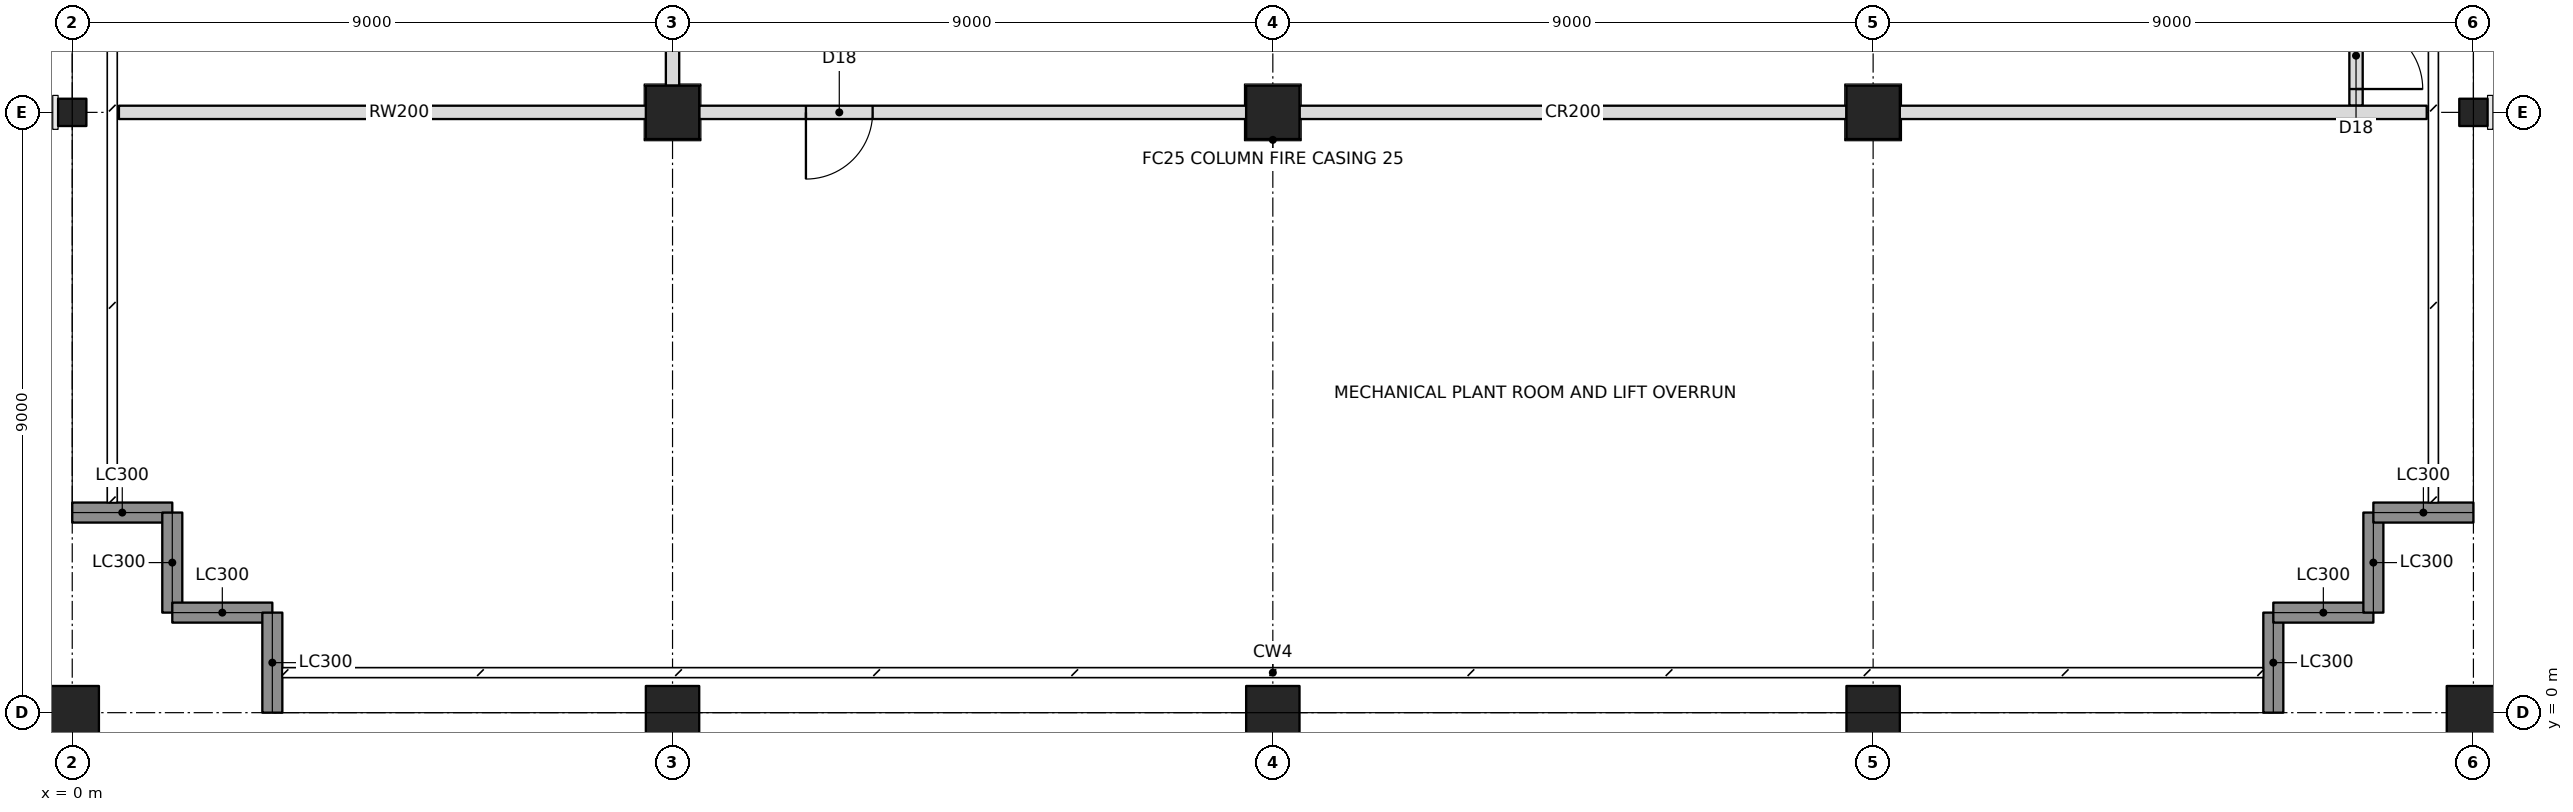
"""IFC4 building model, lengths in metres.
Left out: names, types, materials, properties, quantities, classifications, styles, units other than length and angle.
Written with IfcOpenShell. Run it as: python <this file> out.ifc"""

import sys

from ifc_helpers import new_model, si_unit, direction, frame, frame_2d, origin, origin_with_axes, origin_2d, place, context, subcontext, project, spatial, rectangle, hollow_rectangle, i_section, extrude, element, fill, save


model = new_model("IFC4")
c1 = context("Model", 3, precision=1e-05, world=origin(), true_north=direction((0.0, 1.0)))
c2 = subcontext(c1, "Body", "Model", "MODEL_VIEW")
j1 = project(units=[si_unit("LENGTHUNIT", "METRE"), si_unit("PLANEANGLEUNIT", "RADIAN")], contexts=[c1])
p1 = place(None, origin())
s1 = spatial("IfcSite", under=j1, at=p1, CompositionType="ELEMENT")
p2 = place(p1, origin())
s2 = spatial("IfcBuilding", under=s1, at=p2, CompositionType="ELEMENT")
p3 = place(p2, frame((0.0, 0.0, 274.8)))
s3 = spatial("IfcBuildingStorey", under=s2, at=p3, CompositionType="ELEMENT", Elevation=274.8)
p4 = place(p3, origin_with_axes())
e1 = element("IfcColumn", 1, at=p4, inside=s3, PredefinedType="COLUMN", context=c2, shape_type="SweptSolid", body=[
    extrude(hollow_rectangle(XDim=0.8, YDim=0.8, WallThickness=0.025, at=origin_2d()), origin(), (0.0, 0.0, 1.0), 5.0),
])
p5 = place(p3, frame((0.0, 9.0, 0.0), z_axis=(0.0, 0.0, 1.0), x_axis=(0.0, 1.0, 0.0)))
e2 = element("IfcColumn", 2, at=p5, inside=s3, PredefinedType="COLUMN", context=c2, shape_type="SweptSolid", body=[
    extrude(i_section(OverallWidth=0.409, OverallDepth=0.424, WebThickness=0.033, FlangeThickness=0.052, at=origin_2d()), origin(), (0.0, 0.0, 1.0), 5.0),
])
for number, where, z_axis, x_axis in (
    (3, (9.0, 0.0, 0.0), (0.0, 0.0, 1.0), (1.0, 0.0, 0.0)),
    (4, (9.0, 9.0, 0.0), (0.0, 0.0, 1.0), (1.0, 0.0, 0.0)),
    (5, (18.0, 0.0, 0.0), (0.0, 0.0, 1.0), (1.0, 0.0, 0.0)),
    (6, (18.0, 9.0, 0.0), (0.0, 0.0, 1.0), (1.0, 0.0, 0.0)),
    (7, (27.0, 0.0, 0.0), (0.0, 0.0, 1.0), (1.0, 0.0, 0.0)),
    (8, (27.0, 9.0, 0.0), (0.0, 0.0, 1.0), (1.0, 0.0, 0.0)),
    (9, (36.0, 0.0, 0.0), (0.0, 0.0, 1.0), (1.0, 0.0, 0.0)),
):
    element("IfcColumn", number, at=place(p3, frame(where, z_axis=z_axis, x_axis=x_axis)), inside=s3, PredefinedType="COLUMN", context=c2, shape_type="SweptSolid", body=[
        extrude(hollow_rectangle(XDim=0.8, YDim=0.8, WallThickness=0.025, at=origin_2d()), origin(), (0.0, 0.0, 1.0), 5.0),
    ])
p6 = place(p3, frame((36.0, 9.0, 0.0), z_axis=(0.0, 0.0, 1.0), x_axis=(0.0, 1.0, 0.0)))
e10 = element("IfcColumn", 10, at=p6, inside=s3, PredefinedType="COLUMN", context=c2, shape_type="SweptSolid", body=[
    extrude(i_section(OverallWidth=0.409, OverallDepth=0.424, WebThickness=0.033, FlangeThickness=0.052, at=origin_2d()), origin(), (0.0, 0.0, 1.0), 5.0),
])
p7 = place(p3, frame((33.0, 0.0, 0.0), z_axis=(0.0, 0.0, 1.0), x_axis=(0.0, 1.0, 0.0)))
e11 = element("IfcWall", 11, at=p7, inside=s3, PredefinedType="SOLIDWALL", context=c2, shape_type="SweptSolid", body=[
    extrude(rectangle(XDim=1.5, YDim=0.3, at=frame_2d((0.75, 0.0))), origin(), (0.0, 0.0, 1.0), 3.92),
])
p8 = place(p3, frame((33.0, 1.5, 0.0), z_axis=(0.0, 0.0, 1.0), x_axis=(1.0, 0.0, 0.0)))
e12 = element("IfcWall", 12, at=p8, inside=s3, PredefinedType="SOLIDWALL", context=c2, shape_type="SweptSolid", body=[
    extrude(rectangle(XDim=1.5, YDim=0.3, at=frame_2d((0.75, 0.0))), origin(), (0.0, 0.0, 1.0), 4.092),
])
p9 = place(p3, frame((34.5, 1.5, 0.0), z_axis=(0.0, 0.0, 1.0), x_axis=(0.0, 1.0, 0.0)))
e13 = element("IfcWall", 13, at=p9, inside=s3, PredefinedType="SOLIDWALL", context=c2, shape_type="SweptSolid", body=[
    extrude(rectangle(XDim=1.5, YDim=0.3, at=frame_2d((0.75, 0.0))), origin(), (0.0, 0.0, 1.0), 4.7),
])
for number, where, z_axis, x_axis in (
    (14, (34.5, 3.0, 0.0), (0.0, 0.0, 1.0), (1.0, 0.0, 0.0)),
    (15, (0.0, 3.0, 0.0), (0.0, 0.0, 1.0), (1.0, 0.0, 0.0)),
):
    element("IfcWall", number, at=place(p3, frame(where, z_axis=z_axis, x_axis=x_axis)), inside=s3, PredefinedType="SOLIDWALL", context=c2, shape_type="SweptSolid", body=[
        extrude(rectangle(XDim=1.5, YDim=0.3, at=frame_2d((0.75, 0.0))), origin(), (0.0, 0.0, 1.0), 3.92),
    ])
p10 = place(p3, frame((1.5, 3.0, 0.0), z_axis=(0.0, 0.0, 1.0), x_axis=(0.0, -1.0, 0.0)))
e16 = element("IfcWall", 16, at=p10, inside=s3, PredefinedType="SOLIDWALL", context=c2, shape_type="SweptSolid", body=[
    extrude(rectangle(XDim=1.5, YDim=0.3, at=frame_2d((0.75, 0.0))), origin(), (0.0, 0.0, 1.0), 4.7),
])
p11 = place(p3, frame((1.5, 1.5, 0.0), z_axis=(0.0, 0.0, 1.0), x_axis=(1.0, 0.0, 0.0)))
e17 = element("IfcWall", 17, at=p11, inside=s3, PredefinedType="SOLIDWALL", context=c2, shape_type="SweptSolid", body=[
    extrude(rectangle(XDim=1.5, YDim=0.3, at=frame_2d((0.75, 0.0))), origin(), (0.0, 0.0, 1.0), 4.092),
])
p12 = place(p3, frame((3.0, 1.5, 0.0), z_axis=(0.0, 0.0, 1.0), x_axis=(0.0, -1.0, 0.0)))
e18 = element("IfcWall", 18, at=p12, inside=s3, PredefinedType="SOLIDWALL", context=c2, shape_type="SweptSolid", body=[
    extrude(rectangle(XDim=1.5, YDim=0.3, at=frame_2d((0.75, 0.0))), origin(), (0.0, 0.0, 1.0), 3.92),
])
p13 = place(p3, frame((9.0, 9.4, 0.0), z_axis=(0.0, 0.0, 1.0), x_axis=(0.0, 1.0, 0.0)))
e19 = element("IfcWall", 19, at=p13, inside=s3, PredefinedType="PARTITIONING", context=c2, shape_type="SweptSolid", body=[
    extrude(rectangle(XDim=8.2, YDim=0.2, at=frame_2d((4.1, 0.0))), origin(), (0.0, 0.0, 1.0), 3.938),
])
p14 = place(p13, frame((2.6, 0.0, 0.0)))
e20 = element("IfcOpeningElement", 20, at=p14, cuts=e19, PredefinedType="OPENING", context=c2, shape_type="SweptSolid", body=[
    extrude(rectangle(XDim=1.0, YDim=2.1, at=frame_2d((0.5, 1.05))), frame((0.0, 0.11, 0.0), z_axis=(0.0, -1.0, 0.0), x_axis=(1.0, 0.0, 0.0)), (0.0, 0.0, 1.0), 0.22),
])
p15 = place(p3, frame((0.7, 9.0, 0.0), z_axis=(0.0, 0.0, 1.0), x_axis=(1.0, 0.0, 0.0)))
e21 = element("IfcWall", 21, at=p15, inside=s3, PredefinedType="PARTITIONING", context=c2, shape_type="SweptSolid", body=[
    extrude(rectangle(XDim=8.4, YDim=0.2, at=frame_2d((4.2, 0.0))), origin(), (0.0, 0.0, 1.0), 3.938),
])
p16 = place(p3, frame((9.4, 9.0, 0.0), z_axis=(0.0, 0.0, 1.0), x_axis=(1.0, 0.0, 0.0)))
e22 = element("IfcWall", 22, at=p16, inside=s3, PredefinedType="PARTITIONING", context=c2, shape_type="SweptSolid", body=[
    extrude(rectangle(XDim=8.2, YDim=0.2, at=frame_2d((4.1, 0.0))), origin(), (0.0, 0.0, 1.0), 3.938),
])
p17 = place(p16, frame((1.6, 0.0, 0.0)))
e23 = element("IfcOpeningElement", 23, at=p17, cuts=e22, PredefinedType="OPENING", context=c2, shape_type="SweptSolid", body=[
    extrude(rectangle(XDim=1.0, YDim=2.1, at=frame_2d((0.5, 1.05))), frame((0.0, 0.11, 0.0), z_axis=(0.0, -1.0, 0.0), x_axis=(1.0, 0.0, 0.0)), (0.0, 0.0, 1.0), 0.22),
])
p18 = place(p3, frame((18.4, 9.0, 0.0), z_axis=(0.0, 0.0, 1.0), x_axis=(1.0, 0.0, 0.0)))
e24 = element("IfcWall", 24, at=p18, inside=s3, PredefinedType="PARTITIONING", context=c2, shape_type="SweptSolid", body=[
    extrude(rectangle(XDim=8.2, YDim=0.2, at=frame_2d((4.1, 0.0))), origin(), (0.0, 0.0, 1.0), 3.52),
])
p19 = place(p3, frame((27.4, 9.0, 0.0), z_axis=(0.0, 0.0, 1.0), x_axis=(1.0, 0.0, 0.0)))
e25 = element("IfcWall", 25, at=p19, inside=s3, PredefinedType="PARTITIONING", context=c2, shape_type="SweptSolid", body=[
    extrude(rectangle(XDim=7.9, YDim=0.2, at=frame_2d((3.95, 0.0))), origin(), (0.0, 0.0, 1.0), 3.938),
])
p20 = place(p3, frame((34.24, 9.1, 0.0), z_axis=(0.0, 0.0, 1.0), x_axis=(0.0, 1.0, 0.0)))
e26 = element("IfcWall", 26, at=p20, inside=s3, PredefinedType="PARTITIONING", context=c2, shape_type="SweptSolid", body=[
    extrude(rectangle(XDim=1.7, YDim=0.2, at=frame_2d((0.85, 0.0))), origin(), (0.0, 0.0, 1.0), 3.938),
])
p21 = place(p20, frame((0.25, 0.0, 0.0)))
e27 = element("IfcOpeningElement", 27, at=p21, cuts=e26, PredefinedType="OPENING", context=c2, shape_type="SweptSolid", body=[
    extrude(rectangle(XDim=1.0, YDim=2.1, at=frame_2d((0.5, 1.05))), frame((0.0, 0.11, 0.0), z_axis=(0.0, -1.0, 0.0), x_axis=(1.0, 0.0, 0.0)), (0.0, 0.0, 1.0), 0.22),
])
p22 = place(p17, frame((1.0, 0.0, 0.0), z_axis=(0.0, 0.0, 1.0), x_axis=(-1.0, 0.0, 0.0)))
e28 = element("IfcDoor", 28, at=p22, inside=s3, OperationType="SINGLE_SWING_RIGHT", PredefinedType="DOOR", context=c2, shape_type="SweptSolid", body=[
    extrude(rectangle(XDim=1.0, YDim=2.1, at=frame_2d((0.5, 1.05))), frame((0.0, 0.025, 0.0), z_axis=(0.0, -1.0, 0.0), x_axis=(1.0, 0.0, 0.0)), (0.0, 0.0, 1.0), 0.05),
])
fill(e23, e28)
p23 = place(p21, frame((1.0, 0.0, 0.0), z_axis=(0.0, 0.0, 1.0), x_axis=(-1.0, 0.0, 0.0)))
e29 = element("IfcDoor", 29, at=p23, inside=s3, OperationType="SINGLE_SWING_RIGHT", PredefinedType="DOOR", context=c2, shape_type="SweptSolid", body=[
    extrude(rectangle(XDim=1.0, YDim=2.1, at=frame_2d((0.5, 1.05))), frame((0.0, 0.025, 0.0), z_axis=(0.0, -1.0, 0.0), x_axis=(1.0, 0.0, 0.0)), (0.0, 0.0, 1.0), 0.05),
])
fill(e27, e29)
save(model, sys.argv[1])
